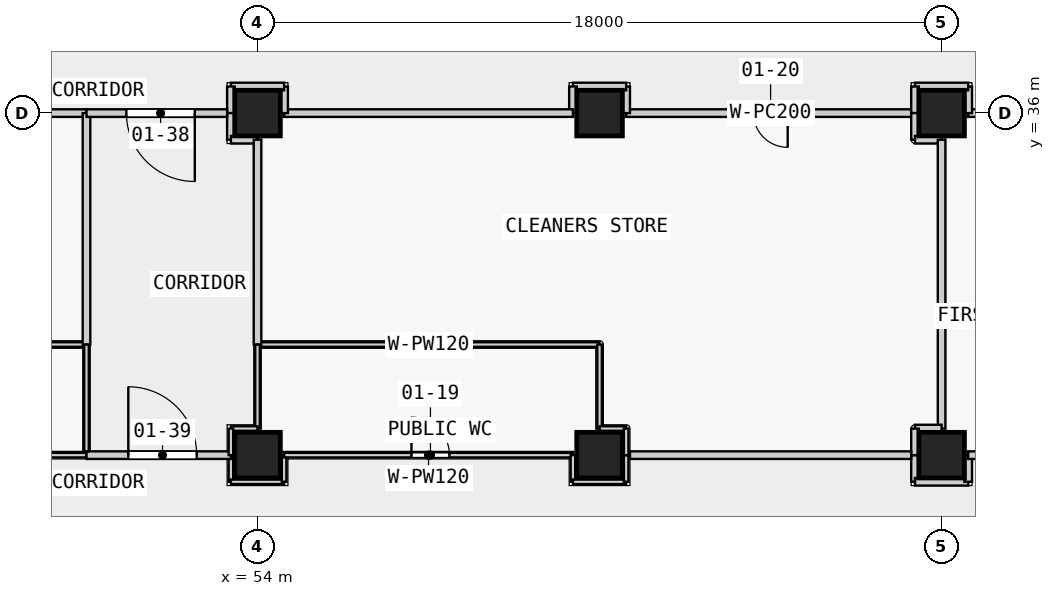
"""IFC4 building model, lengths in metres.
Left out: names, types, materials, properties, quantities, classifications, styles, units other than length and angle.
Written with IfcOpenShell. Run it as: python <this file> out.ifc"""

import sys

from ifc_helpers import new_model, si_unit, direction, frame, frame_2d, origin, origin_2d, place, context, subcontext, project, spatial, rectangle, extrude, element, fill, save


model = new_model("IFC4")
c1 = context("Model", 3, precision=1e-05, world=origin(), true_north=direction((0.0, 1.0)))
c2 = subcontext(c1, "Body", "Model", "MODEL_VIEW")
j1 = project(units=[si_unit("LENGTHUNIT", "METRE"), si_unit("PLANEANGLEUNIT", "RADIAN")], contexts=[c1])
p1 = place(None, origin())
s1 = spatial("IfcSite", under=j1, at=p1, CompositionType="ELEMENT")
p2 = place(p1, origin())
s2 = spatial("IfcBuilding", under=s1, at=p2, CompositionType="ELEMENT")
p3 = place(p2, frame((0.0, 0.0, 8.0)))
s3 = spatial("IfcBuildingStorey", under=s2, at=p3, CompositionType="ELEMENT", Elevation=8.0)
for number, where, z_axis, x_axis in (
    (1, (54.0, 27.0, 0.0), (0.0, 0.0, 1.0), (1.0, 0.0, 0.0)),
    (2, (54.0, 36.0, 0.0), (0.0, 0.0, 1.0), (1.0, 0.0, 0.0)),
    (3, (63.0, 27.0, 0.0), (0.0, 0.0, 1.0), (1.0, 0.0, 0.0)),
    (4, (63.0, 36.0, 0.0), (0.0, 0.0, 1.0), (1.0, 0.0, 0.0)),
    (5, (72.0, 27.0, 0.0), (0.0, 0.0, 1.0), (1.0, 0.0, 0.0)),
    (6, (72.0, 36.0, 0.0), (0.0, 0.0, 1.0), (1.0, 0.0, 0.0)),
):
    element("IfcColumn", number, at=place(p3, frame(where, z_axis=z_axis, x_axis=x_axis)), inside=s3, PredefinedType="COLUMN", context=c2, shape_type="SweptSolid", body=[
        extrude(rectangle(XDim=1.2, YDim=1.2, at=origin_2d()), origin(), (0.0, 0.0, 1.0), 4.8),
    ])
p4 = place(p3, frame((49.5, 36.0, 0.0), z_axis=(0.0, 0.0, 1.0), x_axis=(-1.0, 0.0, 0.0)))
e7 = element("IfcWall", 7, at=p4, inside=s3, PredefinedType="PARTITIONING", context=c2, shape_type="SweptSolid", body=[
    extrude(rectangle(XDim=3.8, YDim=0.2, at=frame_2d((1.9, 0.0))), origin(), (0.0, 0.0, 1.0), 3.75),
])
p5 = place(p3, frame((71.3, 36.0, 0.0), z_axis=(0.0, 0.0, 1.0), x_axis=(-1.0, 0.0, 0.0)))
e8 = element("IfcWall", 8, at=p5, inside=s3, PredefinedType="PARTITIONING", context=c2, shape_type="SweptSolid", body=[
    extrude(rectangle(XDim=7.6, YDim=0.2, at=frame_2d((3.8, 0.0))), origin(), (0.0, 0.0, 1.0), 3.75),
])
p6 = place(p5, frame((3.35, 0.0, 0.0)))
e9 = element("IfcOpeningElement", 9, at=p6, cuts=e8, PredefinedType="OPENING", context=c2, shape_type="SweptSolid", body=[
    extrude(rectangle(XDim=0.9, YDim=2.1, at=frame_2d((0.45, 1.05))), frame((0.0, 0.11, 0.0), z_axis=(0.0, -1.0, 0.0), x_axis=(1.0, 0.0, 0.0)), (0.0, 0.0, 1.0), 0.22),
])
p7 = place(p3, frame((63.7, 36.0, 0.0), z_axis=(0.0, 0.0, 1.0), x_axis=(0.0, 1.0, 0.0)))
e10 = element("IfcWall", 10, at=p7, inside=s3, PredefinedType="PARTITIONING", context=c2, shape_type="SweptSolid", body=[
    extrude(rectangle(XDim=0.7, YDim=0.2, at=frame_2d((0.35, 0.0))), origin(), (0.0, 0.0, 1.0), 3.75),
])
p8 = place(p3, frame((63.7, 36.7, 0.0), z_axis=(0.0, 0.0, 1.0), x_axis=(-1.0, 0.0, 0.0)))
e11 = element("IfcWall", 11, at=p8, inside=s3, PredefinedType="PARTITIONING", context=c2, shape_type="SweptSolid", body=[
    extrude(rectangle(XDim=1.4, YDim=0.2, at=frame_2d((0.7, 0.0))), origin(), (0.0, 0.0, 1.0), 3.75),
])
p9 = place(p3, frame((62.3, 36.7, 0.0), z_axis=(0.0, 0.0, 1.0), x_axis=(0.0, -1.0, 0.0)))
e12 = element("IfcWall", 12, at=p9, inside=s3, PredefinedType="PARTITIONING", context=c2, shape_type="SweptSolid", body=[
    extrude(rectangle(XDim=0.7, YDim=0.2, at=frame_2d((0.35, 0.0))), origin(), (0.0, 0.0, 1.0), 3.75),
])
p10 = place(p3, frame((62.3, 36.0, 0.0), z_axis=(0.0, 0.0, 1.0), x_axis=(-1.0, 0.0, 0.0)))
e13 = element("IfcWall", 13, at=p10, inside=s3, PredefinedType="PARTITIONING", context=c2, shape_type="SweptSolid", body=[
    extrude(rectangle(XDim=7.6, YDim=0.2, at=frame_2d((3.8, 0.0))), origin(), (0.0, 0.0, 1.0), 3.75),
])
p11 = place(p3, frame((54.7, 36.0, 0.0), z_axis=(0.0, 0.0, 1.0), x_axis=(0.0, 1.0, 0.0)))
e14 = element("IfcWall", 14, at=p11, inside=s3, PredefinedType="PARTITIONING", context=c2, shape_type="SweptSolid", body=[
    extrude(rectangle(XDim=0.7, YDim=0.2, at=frame_2d((0.35, 0.0))), origin(), (0.0, 0.0, 1.0), 3.75),
])
p12 = place(p3, frame((54.7, 36.7, 0.0), z_axis=(0.0, 0.0, 1.0), x_axis=(-1.0, 0.0, 0.0)))
e15 = element("IfcWall", 15, at=p12, inside=s3, PredefinedType="PARTITIONING", context=c2, shape_type="SweptSolid", body=[
    extrude(rectangle(XDim=1.4, YDim=0.2, at=frame_2d((0.7, 0.0))), origin(), (0.0, 0.0, 1.0), 3.75),
])
p13 = place(p3, frame((53.3, 36.7, 0.0), z_axis=(0.0, 0.0, 1.0), x_axis=(0.0, -1.0, 0.0)))
e16 = element("IfcWall", 16, at=p13, inside=s3, PredefinedType="PARTITIONING", context=c2, shape_type="SweptSolid", body=[
    extrude(rectangle(XDim=0.7, YDim=0.2, at=frame_2d((0.35, 0.0))), origin(), (0.0, 0.0, 1.0), 3.75),
])
p14 = place(p3, frame((53.3, 27.0, 0.0), z_axis=(0.0, 0.0, 1.0), x_axis=(0.0, -1.0, 0.0)))
e17 = element("IfcWall", 17, at=p14, inside=s3, PredefinedType="PARTITIONING", context=c2, shape_type="SweptSolid", body=[
    extrude(rectangle(XDim=0.7, YDim=0.12, at=frame_2d((0.35, 0.0))), origin(), (0.0, 0.0, 1.0), 3.75),
])
p15 = place(p3, frame((53.3, 26.3, 0.0), z_axis=(0.0, 0.0, 1.0), x_axis=(1.0, 0.0, 0.0)))
e18 = element("IfcWall", 18, at=p15, inside=s3, PredefinedType="PARTITIONING", context=c2, shape_type="SweptSolid", body=[
    extrude(rectangle(XDim=1.4, YDim=0.12, at=frame_2d((0.7, 0.0))), origin(), (0.0, 0.0, 1.0), 3.75),
])
p16 = place(p3, frame((54.7, 26.3, 0.0), z_axis=(0.0, 0.0, 1.0), x_axis=(0.0, 1.0, 0.0)))
e19 = element("IfcWall", 19, at=p16, inside=s3, PredefinedType="PARTITIONING", context=c2, shape_type="SweptSolid", body=[
    extrude(rectangle(XDim=0.7, YDim=0.12, at=frame_2d((0.35, 0.0))), origin(), (0.0, 0.0, 1.0), 3.75),
])
p17 = place(p3, frame((54.7, 27.0, 0.0), z_axis=(0.0, 0.0, 1.0), x_axis=(1.0, 0.0, 0.0)))
e20 = element("IfcWall", 20, at=p17, inside=s3, PredefinedType="PARTITIONING", context=c2, shape_type="SweptSolid", body=[
    extrude(rectangle(XDim=7.6, YDim=0.12, at=frame_2d((3.8, 0.0))), origin(), (0.0, 0.0, 1.0), 3.75),
])
p18 = place(p17, frame((3.35, 0.0, 0.0)))
e21 = element("IfcOpeningElement", 21, at=p18, cuts=e20, PredefinedType="OPENING", context=c2, shape_type="SweptSolid", body=[
    extrude(rectangle(XDim=1.0, YDim=2.1, at=frame_2d((0.5, 1.05))), frame((0.0, 0.07, 0.0), z_axis=(0.0, -1.0, 0.0), x_axis=(1.0, 0.0, 0.0)), (0.0, 0.0, 1.0), 0.14),
])
p19 = place(p3, frame((62.3, 27.0, 0.0), z_axis=(0.0, 0.0, 1.0), x_axis=(0.0, -1.0, 0.0)))
e22 = element("IfcWall", 22, at=p19, inside=s3, PredefinedType="PARTITIONING", context=c2, shape_type="SweptSolid", body=[
    extrude(rectangle(XDim=0.7, YDim=0.12, at=frame_2d((0.35, 0.0))), origin(), (0.0, 0.0, 1.0), 3.75),
])
p20 = place(p3, frame((62.3, 26.3, 0.0), z_axis=(0.0, 0.0, 1.0), x_axis=(1.0, 0.0, 0.0)))
e23 = element("IfcWall", 23, at=p20, inside=s3, PredefinedType="PARTITIONING", context=c2, shape_type="SweptSolid", body=[
    extrude(rectangle(XDim=1.4, YDim=0.12, at=frame_2d((0.7, 0.0))), origin(), (0.0, 0.0, 1.0), 3.75),
])
p21 = place(p3, frame((63.7, 26.3, 0.0), z_axis=(0.0, 0.0, 1.0), x_axis=(0.0, 1.0, 0.0)))
e24 = element("IfcWall", 24, at=p21, inside=s3, PredefinedType="PARTITIONING", context=c2, shape_type="SweptSolid", body=[
    extrude(rectangle(XDim=0.7, YDim=0.12, at=frame_2d((0.35, 0.0))), origin(), (0.0, 0.0, 1.0), 3.75),
])
p22 = place(p3, frame((54.0, 29.911, 0.0), z_axis=(0.0, 0.0, 1.0), x_axis=(1.0, 0.0, 0.0)))
e25 = element("IfcWall", 25, at=p22, inside=s3, PredefinedType="PARTITIONING", context=c2, shape_type="SweptSolid", body=[
    extrude(rectangle(XDim=9.0, YDim=0.12, at=frame_2d((4.5, 0.0))), origin(), (0.0, 0.0, 1.0), 3.75),
])
p23 = place(p3, frame((63.0, 29.911, 0.0), z_axis=(0.0, 0.0, 1.0), x_axis=(0.0, -1.0, 0.0)))
e26 = element("IfcWall", 26, at=p23, inside=s3, PredefinedType="PARTITIONING", context=c2, shape_type="SweptSolid", body=[
    extrude(rectangle(XDim=2.211, YDim=0.12, at=frame_2d((1.105, 0.0))), origin(), (0.0, 0.0, 1.0), 3.75),
])
for number, where, z_axis, x_axis in (
    (27, (63.0, 27.7, 0.0), (0.0, 0.0, 1.0), (1.0, 0.0, 0.0)),
    (28, (63.7, 27.7, 0.0), (0.0, 0.0, 1.0), (0.0, -1.0, 0.0)),
):
    element("IfcWall", number, at=place(p3, frame(where, z_axis=z_axis, x_axis=x_axis)), inside=s3, PredefinedType="PARTITIONING", context=c2, shape_type="SweptSolid", body=[
        extrude(rectangle(XDim=0.7, YDim=0.12, at=frame_2d((0.35, 0.0))), origin(), (0.0, 0.0, 1.0), 3.75),
    ])
p24 = place(p3, frame((80.3, 36.0, 0.0), z_axis=(0.0, 0.0, 1.0), x_axis=(-1.0, 0.0, 0.0)))
e29 = element("IfcWall", 29, at=p24, inside=s3, PredefinedType="PARTITIONING", context=c2, shape_type="SweptSolid", body=[
    extrude(rectangle(XDim=7.6, YDim=0.2, at=frame_2d((3.8, 0.0))), origin(), (0.0, 0.0, 1.0), 3.75),
])
p25 = place(p24, frame((3.1, 0.0, 0.0)))
e30 = element("IfcOpeningElement", 30, at=p25, cuts=e29, PredefinedType="OPENING", context=c2, shape_type="SweptSolid", body=[
    extrude(rectangle(XDim=1.4, YDim=2.1, at=frame_2d((0.7, 1.05))), frame((0.0, 0.11, 0.0), z_axis=(0.0, -1.0, 0.0), x_axis=(1.0, 0.0, 0.0)), (0.0, 0.0, 1.0), 0.22),
])
p26 = place(p3, frame((72.7, 36.0, 0.0), z_axis=(0.0, 0.0, 1.0), x_axis=(0.0, 1.0, 0.0)))
e31 = element("IfcWall", 31, at=p26, inside=s3, PredefinedType="PARTITIONING", context=c2, shape_type="SweptSolid", body=[
    extrude(rectangle(XDim=0.7, YDim=0.2, at=frame_2d((0.35, 0.0))), origin(), (0.0, 0.0, 1.0), 3.75),
])
p27 = place(p3, frame((72.7, 36.7, 0.0), z_axis=(0.0, 0.0, 1.0), x_axis=(-1.0, 0.0, 0.0)))
e32 = element("IfcWall", 32, at=p27, inside=s3, PredefinedType="PARTITIONING", context=c2, shape_type="SweptSolid", body=[
    extrude(rectangle(XDim=1.4, YDim=0.2, at=frame_2d((0.7, 0.0))), origin(), (0.0, 0.0, 1.0), 3.75),
])
for number, where, z_axis, x_axis in (
    (33, (71.3, 36.7, 0.0), (0.0, 0.0, 1.0), (0.0, -1.0, 0.0)),
    (34, (71.3, 27.0, 0.0), (0.0, 0.0, 1.0), (0.0, -1.0, 0.0)),
):
    element("IfcWall", number, at=place(p3, frame(where, z_axis=z_axis, x_axis=x_axis)), inside=s3, PredefinedType="PARTITIONING", context=c2, shape_type="SweptSolid", body=[
        extrude(rectangle(XDim=0.7, YDim=0.2, at=frame_2d((0.35, 0.0))), origin(), (0.0, 0.0, 1.0), 3.75),
    ])
p28 = place(p3, frame((71.3, 26.3, 0.0), z_axis=(0.0, 0.0, 1.0), x_axis=(1.0, 0.0, 0.0)))
e35 = element("IfcWall", 35, at=p28, inside=s3, PredefinedType="PARTITIONING", context=c2, shape_type="SweptSolid", body=[
    extrude(rectangle(XDim=1.4, YDim=0.2, at=frame_2d((0.7, 0.0))), origin(), (0.0, 0.0, 1.0), 4.45),
])
p29 = place(p3, frame((72.7, 26.3, 0.0), z_axis=(0.0, 0.0, 1.0), x_axis=(0.0, 1.0, 0.0)))
e36 = element("IfcWall", 36, at=p29, inside=s3, PredefinedType="PARTITIONING", context=c2, shape_type="SweptSolid", body=[
    extrude(rectangle(XDim=0.7, YDim=0.2, at=frame_2d((0.35, 0.0))), origin(), (0.0, 0.0, 1.0), 3.75),
])
p30 = place(p3, frame((72.7, 27.0, 0.0), z_axis=(0.0, 0.0, 1.0), x_axis=(1.0, 0.0, 0.0)))
e37 = element("IfcWall", 37, at=p30, inside=s3, PredefinedType="PARTITIONING", context=c2, shape_type="SweptSolid", body=[
    extrude(rectangle(XDim=7.6, YDim=0.2, at=frame_2d((3.8, 0.0))), origin(), (0.0, 0.0, 1.0), 3.75),
])
for number, where, z_axis, x_axis in (
    (38, (71.3, 36.0, 0.0), (0.0, 0.0, 1.0), (0.0, -1.0, 0.0)),
    (39, (71.3, 35.3, 0.0), (0.0, 0.0, 1.0), (1.0, 0.0, 0.0)),
):
    element("IfcWall", number, at=place(p3, frame(where, z_axis=z_axis, x_axis=x_axis)), inside=s3, PredefinedType="PARTITIONING", context=c2, shape_type="SweptSolid", body=[
        extrude(rectangle(XDim=0.7, YDim=0.2, at=frame_2d((0.35, 0.0))), origin(), (0.0, 0.0, 1.0), 3.75),
    ])
p31 = place(p3, frame((72.0, 35.3, 0.0), z_axis=(0.0, 0.0, 1.0), x_axis=(0.0, -1.0, 0.0)))
e40 = element("IfcWall", 40, at=p31, inside=s3, PredefinedType="PARTITIONING", context=c2, shape_type="SweptSolid", body=[
    extrude(rectangle(XDim=7.6, YDim=0.2, at=frame_2d((3.8, 0.0))), origin(), (0.0, 0.0, 1.0), 3.75),
])
for number, where, z_axis, x_axis in (
    (41, (72.0, 27.7, 0.0), (0.0, 0.0, 1.0), (-1.0, 0.0, 0.0)),
    (42, (71.3, 27.7, 0.0), (0.0, 0.0, 1.0), (0.0, -1.0, 0.0)),
):
    element("IfcWall", number, at=place(p3, frame(where, z_axis=z_axis, x_axis=x_axis)), inside=s3, PredefinedType="PARTITIONING", context=c2, shape_type="SweptSolid", body=[
        extrude(rectangle(XDim=0.7, YDim=0.2, at=frame_2d((0.35, 0.0))), origin(), (0.0, 0.0, 1.0), 3.75),
    ])
p32 = place(p3, frame((49.5, 29.911, 0.0), z_axis=(0.0, 0.0, 1.0), x_axis=(-1.0, 0.0, 0.0)))
e43 = element("IfcWall", 43, at=p32, inside=s3, PredefinedType="PARTITIONING", context=c2, shape_type="SweptSolid", body=[
    extrude(rectangle(XDim=4.5, YDim=0.12, at=frame_2d((2.25, 0.0))), origin(), (0.0, 0.0, 1.0), 3.75),
])
p33 = place(p3, frame((63.8, 27.0, 0.0), z_axis=(0.0, 0.0, 1.0), x_axis=(1.0, 0.0, 0.0)))
e44 = element("IfcWall", 44, at=p33, inside=s3, PredefinedType="PARTITIONING", context=c2, shape_type="SweptSolid", body=[
    extrude(rectangle(XDim=7.4, YDim=0.2, at=frame_2d((3.7, 0.0))), origin(), (0.0, 0.0, 1.0), 3.75),
])
for number, where, z_axis, x_axis in (
    (45, (53.3, 36.0, 0.0), (0.0, 0.0, 1.0), (0.0, -1.0, 0.0)),
    (46, (53.3, 35.3, 0.0), (0.0, 0.0, 1.0), (1.0, 0.0, 0.0)),
):
    element("IfcWall", number, at=place(p3, frame(where, z_axis=z_axis, x_axis=x_axis)), inside=s3, PredefinedType="PARTITIONING", context=c2, shape_type="SweptSolid", body=[
        extrude(rectangle(XDim=0.7, YDim=0.2, at=frame_2d((0.35, 0.0))), origin(), (0.0, 0.0, 1.0), 3.75),
    ])
p34 = place(p3, frame((54.0, 35.3, 0.0), z_axis=(0.0, 0.0, 1.0), x_axis=(0.0, -1.0, 0.0)))
e47 = element("IfcWall", 47, at=p34, inside=s3, PredefinedType="PARTITIONING", context=c2, shape_type="SweptSolid", body=[
    extrude(rectangle(XDim=5.389, YDim=0.2, at=frame_2d((2.695, 0.0))), origin(), (0.0, 0.0, 1.0), 3.75),
])
p35 = place(p3, frame((45.7, 27.0, 0.0), z_axis=(0.0, 0.0, 1.0), x_axis=(1.0, 0.0, 0.0)))
e48 = element("IfcWall", 48, at=p35, inside=s3, PredefinedType="PARTITIONING", context=c2, shape_type="SweptSolid", body=[
    extrude(rectangle(XDim=3.8, YDim=0.12, at=frame_2d((1.9, 0.0))), origin(), (0.0, 0.0, 1.0), 3.75),
])
p36 = place(p35, frame((1.35, 0.0, 0.0)))
e49 = element("IfcOpeningElement", 49, at=p36, cuts=e48, PredefinedType="OPENING", context=c2, shape_type="SweptSolid", body=[
    extrude(rectangle(XDim=1.0, YDim=2.1, at=frame_2d((0.5, 1.05))), frame((0.0, 0.07, 0.0), z_axis=(0.0, -1.0, 0.0), x_axis=(1.0, 0.0, 0.0)), (0.0, 0.0, 1.0), 0.14),
])
p37 = place(p3, frame((49.5, 29.911, 0.0), z_axis=(0.0, 0.0, 1.0), x_axis=(0.0, 1.0, 0.0)))
e50 = element("IfcWall", 50, at=p37, inside=s3, PredefinedType="PARTITIONING", context=c2, shape_type="SweptSolid", body=[
    extrude(rectangle(XDim=6.089, YDim=0.2, at=frame_2d((3.044, 0.0))), origin(), (0.0, 0.0, 1.0), 3.75),
])
p38 = place(p3, frame((53.2, 36.0, 0.0), z_axis=(0.0, 0.0, 1.0), x_axis=(-1.0, 0.0, 0.0)))
e51 = element("IfcWall", 51, at=p38, inside=s3, PredefinedType="PARTITIONING", context=c2, shape_type="SweptSolid", body=[
    extrude(rectangle(XDim=3.7, YDim=0.2, at=frame_2d((1.85, 0.0))), origin(), (0.0, 0.0, 1.0), 3.75),
])
p39 = place(p38, frame((0.85, 0.0, 0.0)))
e52 = element("IfcOpeningElement", 52, at=p39, cuts=e51, PredefinedType="OPENING", context=c2, shape_type="SweptSolid", body=[
    extrude(rectangle(XDim=1.8, YDim=2.1, at=frame_2d((0.9, 1.05))), frame((0.0, 0.11, 0.0), z_axis=(0.0, -1.0, 0.0), x_axis=(1.0, 0.0, 0.0)), (0.0, 0.0, 1.0), 0.22),
])
p40 = place(p3, frame((49.5, 27.0, 0.0), z_axis=(0.0, 0.0, 1.0), x_axis=(1.0, 0.0, 0.0)))
e53 = element("IfcWall", 53, at=p40, inside=s3, PredefinedType="PARTITIONING", context=c2, shape_type="SweptSolid", body=[
    extrude(rectangle(XDim=3.8, YDim=0.2, at=frame_2d((1.9, 0.0))), origin(), (0.0, 0.0, 1.0), 3.75),
])
p41 = place(p40, frame((1.1, 0.0, 0.0)))
e54 = element("IfcOpeningElement", 54, at=p41, cuts=e53, PredefinedType="OPENING", context=c2, shape_type="SweptSolid", body=[
    extrude(rectangle(XDim=1.8, YDim=2.1, at=frame_2d((0.9, 1.05))), frame((0.0, 0.11, 0.0), z_axis=(0.0, -1.0, 0.0), x_axis=(1.0, 0.0, 0.0)), (0.0, 0.0, 1.0), 0.22),
])
p42 = place(p3, frame((54.0, 29.911, 0.0), z_axis=(0.0, 0.0, 1.0), x_axis=(0.0, -1.0, 0.0)))
e55 = element("IfcWall", 55, at=p42, inside=s3, PredefinedType="PARTITIONING", context=c2, shape_type="SweptSolid", body=[
    extrude(rectangle(XDim=2.211, YDim=0.12, at=frame_2d((1.105, 0.0))), origin(), (0.0, 0.0, 1.0), 3.75),
])
for number, where, z_axis, x_axis in (
    (56, (54.0, 27.7, 0.0), (0.0, 0.0, 1.0), (-1.0, 0.0, 0.0)),
    (57, (53.3, 27.7, 0.0), (0.0, 0.0, 1.0), (0.0, -1.0, 0.0)),
):
    element("IfcWall", number, at=place(p3, frame(where, z_axis=z_axis, x_axis=x_axis)), inside=s3, PredefinedType="PARTITIONING", context=c2, shape_type="SweptSolid", body=[
        extrude(rectangle(XDim=0.7, YDim=0.12, at=frame_2d((0.35, 0.0))), origin(), (0.0, 0.0, 1.0), 3.75),
    ])
p43 = place(p3, frame((49.5, 27.1, 0.0), z_axis=(0.0, 0.0, 1.0), x_axis=(0.0, 1.0, 0.0)))
e58 = element("IfcWall", 58, at=p43, inside=s3, PredefinedType="PARTITIONING", context=c2, shape_type="SweptSolid", body=[
    extrude(rectangle(XDim=2.811, YDim=0.12, at=frame_2d((1.405, 0.0))), origin(), (0.0, 0.0, 1.0), 3.75),
])
p44 = place(p18, origin())
e59 = element("IfcDoor", 59, at=p44, inside=s3, OperationType="SINGLE_SWING_LEFT", PredefinedType="DOOR", context=c2, shape_type="SweptSolid", body=[
    extrude(rectangle(XDim=1.0, YDim=2.1, at=frame_2d((0.5, 1.05))), frame((0.0, 0.025, 0.0), z_axis=(0.0, -1.0, 0.0), x_axis=(1.0, 0.0, 0.0)), (0.0, 0.0, 1.0), 0.05),
])
fill(e21, e59)
p45 = place(p6, origin())
e60 = element("IfcDoor", 60, at=p45, inside=s3, OperationType="SINGLE_SWING_LEFT", PredefinedType="DOOR", context=c2, shape_type="SweptSolid", body=[
    extrude(rectangle(XDim=0.9, YDim=2.1, at=frame_2d((0.45, 1.05))), frame((0.0, 0.025, 0.0), z_axis=(0.0, -1.0, 0.0), x_axis=(1.0, 0.0, 0.0)), (0.0, 0.0, 1.0), 0.05),
])
fill(e9, e60)
p46 = place(p39, origin())
e61 = element("IfcDoor", 61, at=p46, inside=s3, OperationType="DOUBLE_DOOR_SINGLE_SWING", PredefinedType="DOOR", context=c2, shape_type="SweptSolid", body=[
    extrude(rectangle(XDim=1.8, YDim=2.1, at=frame_2d((0.9, 1.05))), frame((0.0, 0.025, 0.0), z_axis=(0.0, -1.0, 0.0), x_axis=(1.0, 0.0, 0.0)), (0.0, 0.0, 1.0), 0.05),
])
fill(e52, e61)
p47 = place(p41, origin())
e62 = element("IfcDoor", 62, at=p47, inside=s3, OperationType="DOUBLE_DOOR_SINGLE_SWING", PredefinedType="DOOR", context=c2, shape_type="SweptSolid", body=[
    extrude(rectangle(XDim=1.8, YDim=2.1, at=frame_2d((0.9, 1.05))), frame((0.0, 0.025, 0.0), z_axis=(0.0, -1.0, 0.0), x_axis=(1.0, 0.0, 0.0)), (0.0, 0.0, 1.0), 0.05),
])
fill(e54, e62)
save(model, sys.argv[1])
